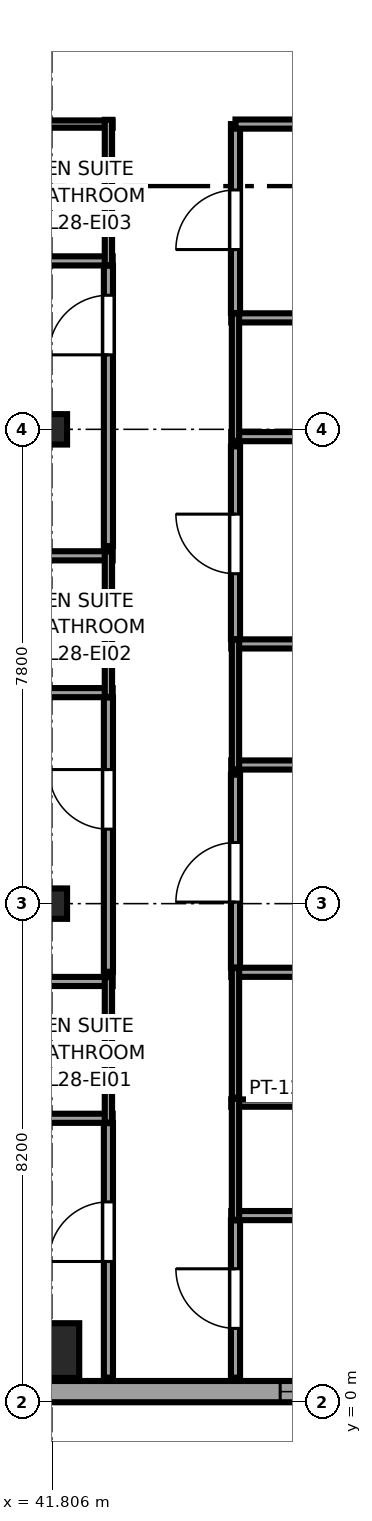
"""IFC4 building model, lengths in metres.
Left out: names, types, materials, properties, quantities, classifications, styles, units other than length and angle.
Written with IfcOpenShell. Run it as: python <this file> out.ifc"""

import sys

from ifc_helpers import new_model, si_unit, direction, frame, frame_2d, origin, origin_2d, place, context, subcontext, project, spatial, rectangle, i_section, extrude, source, transform, mapped, element, fill, save


model = new_model("IFC4")
c1 = context("Model", 3, precision=1e-05, world=origin(), true_north=direction((0.0, 1.0)))
c2 = subcontext(c1, "Body", "Model", "MODEL_VIEW")
j1 = project(units=[si_unit("LENGTHUNIT", "METRE"), si_unit("PLANEANGLEUNIT", "RADIAN")], contexts=[c1])
p1 = place(None, origin())
s1 = spatial("IfcSite", under=j1, at=p1, CompositionType="ELEMENT")
p2 = place(p1, origin())
s2 = spatial("IfcBuilding", under=s1, at=p2, CompositionType="ELEMENT")
p3 = place(p2, frame((0.0, 0.0, 111.55)))
s3 = spatial("IfcBuildingStorey", under=s2, at=p3, CompositionType="ELEMENT", Elevation=111.55)
m1 = source(origin(), c2, "Body", "SweptSolid", [
    extrude(rectangle(XDim=0.9, YDim=0.9, at=origin_2d()), origin(), (0.0, 0.0, 1.0), 3.55),
])
p4 = place(p3, frame((41.8, 0.85, 0.0), z_axis=(0.0, 0.0, 1.0), x_axis=(1.0, 0.0, 0.0)))
e1 = element("IfcColumn", 1, at=p4, inside=s3, PredefinedType="COLUMN", context=c2, shape_type="MappedRepresentation", body=[
    mapped(m1, transform((0.0, 0.0, 0.0), x_axis=(1.0, 0.0, 0.0), y_axis=(0.0, 1.0, 0.0), z_axis=(0.0, 0.0, 1.0), scale=1.0)),
])
m2 = source(origin(), c2, "Body", "SweptSolid", [
    extrude(i_section(OverallWidth=0.5, OverallDepth=0.5, WebThickness=0.022, FlangeThickness=0.034, at=origin_2d()), origin(), (0.0, 0.0, 1.0), 3.55),
])
for number, where, z_axis, x_axis in (
    (2, (41.8, 8.2, 0.0), (0.0, 0.0, 1.0), (1.0, 0.0, 0.0)),
    (3, (41.8, 16.0, 0.0), (0.0, 0.0, 1.0), (1.0, 0.0, 0.0)),
):
    element("IfcColumn", number, at=place(p3, frame(where, z_axis=z_axis, x_axis=x_axis)), inside=s3, PredefinedType="COLUMN", context=c2, shape_type="MappedRepresentation", body=[
        mapped(m2, transform((0.0, 0.0, 0.0), x_axis=(1.0, 0.0, 0.0), y_axis=(0.0, 1.0, 0.0), z_axis=(0.0, 0.0, 1.0), scale=1.0)),
    ])
p5 = place(p3, frame((34.375, 0.175, 0.0), z_axis=(0.0, 0.0, 1.0), x_axis=(1.0, 0.0, 0.0)))
e4 = element("IfcWall", 4, at=p5, inside=s3, PredefinedType="SOLIDWALL", context=c2, shape_type="SweptSolid", body=[
    extrude(rectangle(XDim=18.008, YDim=0.35, at=frame_2d((9.004, 0.0))), origin(), (0.0, 0.0, 1.0), 3.37),
])
p6 = place(p5, frame((1.726, 0.0, 0.68)))
e5 = element("IfcOpeningElement", 5, at=p6, cuts=e4, PredefinedType="OPENING", context=c2, shape_type="SweptSolid", body=[
    extrude(rectangle(XDim=1.95, YDim=1.82, at=frame_2d((0.975, 0.91))), frame((0.0, 0.185, 0.0), z_axis=(0.0, -1.0, 0.0), x_axis=(1.0, 0.0, 0.0)), (0.0, 0.0, 1.0), 0.37),
])
p7 = place(p5, frame((11.18, 0.0, 0.68)))
e6 = element("IfcOpeningElement", 6, at=p7, cuts=e4, PredefinedType="OPENING", context=c2, shape_type="SweptSolid", body=[
    extrude(rectangle(XDim=1.95, YDim=1.82, at=frame_2d((0.975, 0.91))), frame((0.0, 0.185, 0.0), z_axis=(0.0, -1.0, 0.0), x_axis=(1.0, 0.0, 0.0)), (0.0, 0.0, 1.0), 0.37),
])
for number, where, z_axis, x_axis in (
    (7, (40.21, 4.67, 0.0), (0.0, 0.0, 1.0), (1.0, 0.0, 0.0)),
    (8, (40.21, 6.92, 0.0), (0.0, 0.0, 1.0), (1.0, 0.0, 0.0)),
):
    element("IfcWall", number, at=place(p3, frame(where, z_axis=z_axis, x_axis=x_axis)), inside=s3, PredefinedType="PARTITIONING", context=c2, shape_type="SweptSolid", body=[
        extrude(rectangle(XDim=2.59, YDim=0.15, at=frame_2d((1.295, 0.0))), origin(), (0.0, 0.0, 1.0), 3.37),
    ])
p8 = place(p3, frame((42.73, 4.6, 0.0), z_axis=(0.0, 0.0, 1.0), x_axis=(0.0, 1.0, 0.0)))
e9 = element("IfcWall", 9, at=p8, inside=s3, PredefinedType="PLUMBINGWALL", context=c2, shape_type="SweptSolid", body=[
    extrude(rectangle(XDim=2.39, YDim=0.12, at=frame_2d((1.195, 0.0))), origin(), (0.0, 0.0, 1.0), 3.37),
])
for number, where, z_axis, x_axis in (
    (10, (40.21, 11.67, 0.0), (0.0, 0.0, 1.0), (1.0, 0.0, 0.0)),
    (11, (40.21, 13.92, 0.0), (0.0, 0.0, 1.0), (1.0, 0.0, 0.0)),
):
    element("IfcWall", number, at=place(p3, frame(where, z_axis=z_axis, x_axis=x_axis)), inside=s3, PredefinedType="PARTITIONING", context=c2, shape_type="SweptSolid", body=[
        extrude(rectangle(XDim=2.59, YDim=0.15, at=frame_2d((1.295, 0.0))), origin(), (0.0, 0.0, 1.0), 3.37),
    ])
p9 = place(p3, frame((42.73, 11.6, 0.0), z_axis=(0.0, 0.0, 1.0), x_axis=(0.0, 1.0, 0.0)))
e12 = element("IfcWall", 12, at=p9, inside=s3, PredefinedType="PLUMBINGWALL", context=c2, shape_type="SweptSolid", body=[
    extrude(rectangle(XDim=2.39, YDim=0.12, at=frame_2d((1.195, 0.0))), origin(), (0.0, 0.0, 1.0), 3.37),
])
p10 = place(p3, frame((40.21, 18.77, 0.0), z_axis=(0.0, 0.0, 1.0), x_axis=(1.0, 0.0, 0.0)))
e13 = element("IfcWall", 13, at=p10, inside=s3, PredefinedType="PARTITIONING", context=c2, shape_type="SweptSolid", body=[
    extrude(rectangle(XDim=2.59, YDim=0.15, at=frame_2d((1.295, 0.0))), origin(), (0.0, 0.0, 1.0), 3.37),
])
p11 = place(p3, frame((40.21, 21.02, 0.0), z_axis=(0.0, 0.0, 1.0), x_axis=(1.0, 0.0, 0.0)))
e14 = element("IfcWall", 14, at=p11, inside=s3, PredefinedType="PLUMBINGWALL", context=c2, shape_type="SweptSolid", body=[
    extrude(rectangle(XDim=2.59, YDim=0.12, at=frame_2d((1.295, 0.0))), origin(), (0.0, 0.0, 1.0), 3.37),
])
p12 = place(p3, frame((42.73, 18.7, 0.0), z_axis=(0.0, 0.0, 1.0), x_axis=(0.0, 1.0, 0.0)))
e15 = element("IfcWall", 15, at=p12, inside=s3, PredefinedType="PLUMBINGWALL", context=c2, shape_type="SweptSolid", body=[
    extrude(rectangle(XDim=2.39, YDim=0.12, at=frame_2d((1.195, 0.0))), origin(), (0.0, 0.0, 1.0), 3.37),
])
p13 = place(p3, frame((44.75, 3.07, 0.0), z_axis=(0.0, 0.0, 1.0), x_axis=(1.0, 0.0, 0.0)))
e16 = element("IfcWall", 16, at=p13, inside=s3, PredefinedType="PARTITIONING", context=c2, shape_type="SweptSolid", body=[
    extrude(rectangle(XDim=2.59, YDim=0.15, at=frame_2d((1.295, 0.0))), origin(), (0.0, 0.0, 1.0), 3.37),
])
p14 = place(p3, frame((44.75, 4.92, 0.0), z_axis=(0.0, 0.0, 1.0), x_axis=(1.0, 0.0, 0.0)))
e17 = element("IfcWall", 17, at=p14, inside=s3, PredefinedType="PLUMBINGWALL", context=c2, shape_type="SweptSolid", body=[
    extrude(rectangle(XDim=2.59, YDim=0.12, at=frame_2d((1.295, 0.0))), origin(), (0.0, 0.0, 1.0), 3.37),
])
p15 = place(p3, frame((44.82, 3.0, 0.0), z_axis=(0.0, 0.0, 1.0), x_axis=(0.0, 1.0, 0.0)))
e18 = element("IfcWall", 18, at=p15, inside=s3, PredefinedType="PLUMBINGWALL", context=c2, shape_type="SweptSolid", body=[
    extrude(rectangle(XDim=1.99, YDim=0.12, at=frame_2d((0.995, 0.0))), origin(), (0.0, 0.0, 1.0), 3.37),
])
p16 = place(p3, frame((44.75, 7.071, 0.0), z_axis=(0.0, 0.0, 1.0), x_axis=(1.0, 0.0, 0.0)))
e19 = element("IfcWall", 19, at=p16, inside=s3, PredefinedType="PARTITIONING", context=c2, shape_type="SweptSolid", body=[
    extrude(rectangle(XDim=2.59, YDim=0.15, at=frame_2d((1.295, 0.0))), origin(), (0.0, 0.0, 1.0), 3.37),
])
p17 = place(p3, frame((44.82, 5.01, 0.0), z_axis=(0.0, 0.0, 1.0), x_axis=(0.0, 1.0, 0.0)))
e20 = element("IfcWall", 20, at=p17, inside=s3, PredefinedType="PLUMBINGWALL", context=c2, shape_type="SweptSolid", body=[
    extrude(rectangle(XDim=2.131, YDim=0.12, at=frame_2d((1.065, 0.0))), origin(), (0.0, 0.0, 1.0), 3.37),
])
p18 = place(p3, frame((44.75, 10.48, 0.0), z_axis=(0.0, 0.0, 1.0), x_axis=(1.0, 0.0, 0.0)))
e21 = element("IfcWall", 21, at=p18, inside=s3, PredefinedType="PARTITIONING", context=c2, shape_type="SweptSolid", body=[
    extrude(rectangle(XDim=11.845, YDim=0.15, at=frame_2d((5.922, 0.0))), origin(), (0.0, 0.0, 1.0), 3.37),
])
p19 = place(p3, frame((44.75, 12.471, 0.0), z_axis=(0.0, 0.0, 1.0), x_axis=(1.0, 0.0, 0.0)))
e22 = element("IfcWall", 22, at=p19, inside=s3, PredefinedType="PARTITIONING", context=c2, shape_type="SweptSolid", body=[
    extrude(rectangle(XDim=2.59, YDim=0.15, at=frame_2d((1.295, 0.0))), origin(), (0.0, 0.0, 1.0), 3.37),
])
p20 = place(p3, frame((44.82, 10.41, 0.0), z_axis=(0.0, 0.0, 1.0), x_axis=(0.0, 1.0, 0.0)))
e23 = element("IfcWall", 23, at=p20, inside=s3, PredefinedType="PLUMBINGWALL", context=c2, shape_type="SweptSolid", body=[
    extrude(rectangle(XDim=2.131, YDim=0.12, at=frame_2d((1.065, 0.0))), origin(), (0.0, 0.0, 1.0), 3.37),
])
p21 = place(p3, frame((44.75, 15.88, 0.0), z_axis=(0.0, 0.0, 1.0), x_axis=(1.0, 0.0, 0.0)))
e24 = element("IfcWall", 24, at=p21, inside=s3, PredefinedType="PARTITIONING", context=c2, shape_type="SweptSolid", body=[
    extrude(rectangle(XDim=11.845, YDim=0.15, at=frame_2d((5.922, 0.0))), origin(), (0.0, 0.0, 1.0), 2.748),
])
p22 = place(p3, frame((44.75, 17.833, 0.0), z_axis=(0.0, 0.0, 1.0), x_axis=(1.0, 0.0, 0.0)))
e25 = element("IfcWall", 25, at=p22, inside=s3, PredefinedType="PARTITIONING", context=c2, shape_type="SweptSolid", body=[
    extrude(rectangle(XDim=2.59, YDim=0.15, at=frame_2d((1.295, 0.0))), origin(), (0.0, 0.0, 1.0), 3.37),
])
p23 = place(p3, frame((44.82, 15.81, 0.0), z_axis=(0.0, 0.0, 1.0), x_axis=(0.0, 1.0, 0.0)))
e26 = element("IfcWall", 26, at=p23, inside=s3, PredefinedType="PLUMBINGWALL", context=c2, shape_type="SweptSolid", body=[
    extrude(rectangle(XDim=2.093, YDim=0.12, at=frame_2d((1.046, 0.0))), origin(), (0.0, 0.0, 1.0), 3.37),
])
p24 = place(p3, frame((42.73, 0.405, 0.0), z_axis=(0.0, 0.0, 1.0), x_axis=(0.0, 1.0, 0.0)))
e27 = element("IfcWall", 27, at=p24, inside=s3, PredefinedType="PARTITIONING", context=c2, shape_type="SweptSolid", body=[
    extrude(rectangle(XDim=4.185, YDim=0.15, at=frame_2d((2.093, 0.0))), origin(), (0.0, 0.0, 1.0), 3.37),
])
p25 = place(p24, frame((1.91, 0.0, 0.0)))
e28 = element("IfcOpeningElement", 28, at=p25, cuts=e27, PredefinedType="OPENING", context=c2, shape_type="SweptSolid", body=[
    extrude(rectangle(XDim=0.98, YDim=2.12, at=frame_2d((0.49, 1.06))), frame((0.0, 0.085, 0.0), z_axis=(0.0, -1.0, 0.0), x_axis=(1.0, 0.0, 0.0)), (0.0, 0.0, 1.0), 0.17),
])
p26 = place(p3, frame((42.73, 7.08, 0.0), z_axis=(0.0, 0.0, 1.0), x_axis=(0.0, 1.0, 0.0)))
e29 = element("IfcWall", 29, at=p26, inside=s3, PredefinedType="PARTITIONING", context=c2, shape_type="SweptSolid", body=[
    extrude(rectangle(XDim=4.51, YDim=0.15, at=frame_2d((2.255, 0.0))), origin(), (0.0, 0.0, 1.0), 3.37),
])
p27 = place(p26, frame((2.345, 0.0, 0.0)))
e30 = element("IfcOpeningElement", 30, at=p27, cuts=e29, PredefinedType="OPENING", context=c2, shape_type="SweptSolid", body=[
    extrude(rectangle(XDim=0.98, YDim=2.12, at=frame_2d((0.49, 1.06))), frame((0.0, 0.085, 0.0), z_axis=(0.0, -1.0, 0.0), x_axis=(1.0, 0.0, 0.0)), (0.0, 0.0, 1.0), 0.17),
])
p28 = place(p3, frame((42.73, 14.08, 0.0), z_axis=(0.0, 0.0, 1.0), x_axis=(0.0, 1.0, 0.0)))
e31 = element("IfcWall", 31, at=p28, inside=s3, PredefinedType="PARTITIONING", context=c2, shape_type="SweptSolid", body=[
    extrude(rectangle(XDim=4.61, YDim=0.15, at=frame_2d((2.305, 0.0))), origin(), (0.0, 0.0, 1.0), 3.37),
])
p29 = place(p28, frame((3.145, 0.0, 0.0)))
e32 = element("IfcOpeningElement", 32, at=p29, cuts=e31, PredefinedType="OPENING", context=c2, shape_type="SweptSolid", body=[
    extrude(rectangle(XDim=0.98, YDim=2.12, at=frame_2d((0.49, 1.06))), frame((0.0, 0.085, 0.0), z_axis=(0.0, -1.0, 0.0), x_axis=(1.0, 0.0, 0.0)), (0.0, 0.0, 1.0), 0.17),
])
p30 = place(p3, frame((44.82, 0.405, 0.0), z_axis=(0.0, 0.0, 1.0), x_axis=(0.0, 1.0, 0.0)))
e33 = element("IfcWall", 33, at=p30, inside=s3, PredefinedType="PARTITIONING", context=c2, shape_type="SweptSolid", body=[
    extrude(rectangle(XDim=2.585, YDim=0.15, at=frame_2d((1.292, 0.0))), origin(), (0.0, 0.0, 1.0), 3.37),
])
p31 = place(p30, frame((0.81, 0.0, 0.0)))
e34 = element("IfcOpeningElement", 34, at=p31, cuts=e33, PredefinedType="OPENING", context=c2, shape_type="SweptSolid", body=[
    extrude(rectangle(XDim=0.98, YDim=2.12, at=frame_2d((0.49, 1.06))), frame((0.0, 0.085, 0.0), z_axis=(0.0, -1.0, 0.0), x_axis=(1.0, 0.0, 0.0)), (0.0, 0.0, 1.0), 0.17),
])
p32 = place(p3, frame((44.82, 7.151, 0.0), z_axis=(0.0, 0.0, 1.0), x_axis=(0.0, 1.0, 0.0)))
e35 = element("IfcWall", 35, at=p32, inside=s3, PredefinedType="PARTITIONING", context=c2, shape_type="SweptSolid", body=[
    extrude(rectangle(XDim=3.169, YDim=0.15, at=frame_2d((1.584, 0.0))), origin(), (0.0, 0.0, 1.0), 3.37),
])
p33 = place(p32, frame((1.074, 0.0, 0.0)))
e36 = element("IfcOpeningElement", 36, at=p33, cuts=e35, PredefinedType="OPENING", context=c2, shape_type="SweptSolid", body=[
    extrude(rectangle(XDim=0.98, YDim=2.12, at=frame_2d((0.49, 1.06))), frame((0.0, 0.085, 0.0), z_axis=(0.0, -1.0, 0.0), x_axis=(1.0, 0.0, 0.0)), (0.0, 0.0, 1.0), 0.17),
])
p34 = place(p3, frame((44.82, 12.551, 0.0), z_axis=(0.0, 0.0, 1.0), x_axis=(0.0, 1.0, 0.0)))
e37 = element("IfcWall", 37, at=p34, inside=s3, PredefinedType="PARTITIONING", context=c2, shape_type="SweptSolid", body=[
    extrude(rectangle(XDim=3.169, YDim=0.15, at=frame_2d((1.584, 0.0))), origin(), (0.0, 0.0, 1.0), 3.37),
])
p35 = place(p34, frame((1.074, 0.0, 0.0)))
e38 = element("IfcOpeningElement", 38, at=p35, cuts=e37, PredefinedType="OPENING", context=c2, shape_type="SweptSolid", body=[
    extrude(rectangle(XDim=0.98, YDim=2.12, at=frame_2d((0.49, 1.06))), frame((0.0, 0.085, 0.0), z_axis=(0.0, -1.0, 0.0), x_axis=(1.0, 0.0, 0.0)), (0.0, 0.0, 1.0), 0.17),
])
p36 = place(p3, frame((44.82, 17.913, 0.0), z_axis=(0.0, 0.0, 1.0), x_axis=(0.0, 1.0, 0.0)))
e39 = element("IfcWall", 39, at=p36, inside=s3, PredefinedType="PARTITIONING", context=c2, shape_type="SweptSolid", body=[
    extrude(rectangle(XDim=3.107, YDim=0.15, at=frame_2d((1.553, 0.0))), origin(), (0.0, 0.0, 1.0), 3.37),
])
p37 = place(p36, frame((1.043, 0.0, 0.0)))
e40 = element("IfcOpeningElement", 40, at=p37, cuts=e39, PredefinedType="OPENING", context=c2, shape_type="SweptSolid", body=[
    extrude(rectangle(XDim=0.98, YDim=2.12, at=frame_2d((0.49, 1.06))), frame((0.0, 0.085, 0.0), z_axis=(0.0, -1.0, 0.0), x_axis=(1.0, 0.0, 0.0)), (0.0, 0.0, 1.0), 0.17),
])
p38 = place(p3, frame((44.82, 21.02, 0.0), z_axis=(0.0, 0.0, 1.0), x_axis=(1.0, 0.0, 0.0)))
e41 = element("IfcWall", 41, at=p38, inside=s3, PredefinedType="PARTITIONING", context=c2, shape_type="SweptSolid", body=[
    extrude(rectangle(XDim=11.775, YDim=0.15, at=frame_2d((5.887, 0.0))), origin(), (0.0, 0.0, 1.0), 3.37),
])
m3 = source(origin(), c2, "Body", "SweptSolid", [
    extrude(rectangle(XDim=1.95, YDim=1.82, at=frame_2d((0.975, 0.91))), frame((0.0, 0.09, 0.0), z_axis=(0.0, -1.0, 0.0), x_axis=(1.0, 0.0, 0.0)), (0.0, 0.0, 1.0), 0.06),
])
p39 = place(p7, origin())
e42 = element("IfcWindow", 42, at=p39, inside=s3, PartitioningType="DOUBLE_PANEL_VERTICAL", PredefinedType="WINDOW", context=c2, shape_type="MappedRepresentation", body=[
    mapped(m3, transform((0.0, 0.0, 0.0), x_axis=(1.0, 0.0, 0.0), y_axis=(0.0, 1.0, 0.0), z_axis=(0.0, 0.0, 1.0), scale=1.0)),
])
fill(e6, e42)
m4 = source(origin(), c2, "Body", "SweptSolid", [
    extrude(rectangle(XDim=0.98, YDim=2.12, at=frame_2d((0.49, 1.06))), frame((0.0, 0.025, 0.0), z_axis=(0.0, -1.0, 0.0), x_axis=(1.0, 0.0, 0.0)), (0.0, 0.0, 1.0), 0.05),
])
p40 = place(p25, origin())
e43 = element("IfcDoor", 43, at=p40, inside=s3, OperationType="SINGLE_SWING_LEFT", PredefinedType="DOOR", context=c2, shape_type="MappedRepresentation", body=[
    mapped(m4, transform((0.0, 0.0, 0.0), x_axis=(1.0, 0.0, 0.0), y_axis=(0.0, 1.0, 0.0), z_axis=(0.0, 0.0, 1.0), scale=1.0)),
])
fill(e28, e43)
p41 = place(p27, origin())
e44 = element("IfcDoor", 44, at=p41, inside=s3, OperationType="SINGLE_SWING_RIGHT", PredefinedType="DOOR", context=c2, shape_type="MappedRepresentation", body=[
    mapped(m4, transform((0.0, 0.0, 0.0), x_axis=(1.0, 0.0, 0.0), y_axis=(0.0, 1.0, 0.0), z_axis=(0.0, 0.0, 1.0), scale=1.0)),
])
fill(e30, e44)
p42 = place(p29, origin())
e45 = element("IfcDoor", 45, at=p42, inside=s3, OperationType="SINGLE_SWING_LEFT", PredefinedType="DOOR", context=c2, shape_type="MappedRepresentation", body=[
    mapped(m4, transform((0.0, 0.0, 0.0), x_axis=(1.0, 0.0, 0.0), y_axis=(0.0, 1.0, 0.0), z_axis=(0.0, 0.0, 1.0), scale=1.0)),
])
fill(e32, e45)
p43 = place(p31, origin())
e46 = element("IfcDoor", 46, at=p43, inside=s3, OperationType="SINGLE_SWING_RIGHT", PredefinedType="DOOR", context=c2, shape_type="MappedRepresentation", body=[
    mapped(m4, transform((0.0, 0.0, 0.0), x_axis=(1.0, 0.0, 0.0), y_axis=(0.0, 1.0, 0.0), z_axis=(0.0, 0.0, 1.0), scale=1.0)),
])
fill(e34, e46)
p44 = place(p33, origin())
e47 = element("IfcDoor", 47, at=p44, inside=s3, OperationType="SINGLE_SWING_LEFT", PredefinedType="DOOR", context=c2, shape_type="MappedRepresentation", body=[
    mapped(m4, transform((0.0, 0.0, 0.0), x_axis=(1.0, 0.0, 0.0), y_axis=(0.0, 1.0, 0.0), z_axis=(0.0, 0.0, 1.0), scale=1.0)),
])
fill(e36, e47)
p45 = place(p35, origin())
e48 = element("IfcDoor", 48, at=p45, inside=s3, OperationType="SINGLE_SWING_RIGHT", PredefinedType="DOOR", context=c2, shape_type="MappedRepresentation", body=[
    mapped(m4, transform((0.0, 0.0, 0.0), x_axis=(1.0, 0.0, 0.0), y_axis=(0.0, 1.0, 0.0), z_axis=(0.0, 0.0, 1.0), scale=1.0)),
])
fill(e38, e48)
p46 = place(p37, origin())
e49 = element("IfcDoor", 49, at=p46, inside=s3, OperationType="SINGLE_SWING_LEFT", PredefinedType="DOOR", context=c2, shape_type="MappedRepresentation", body=[
    mapped(m4, transform((0.0, 0.0, 0.0), x_axis=(1.0, 0.0, 0.0), y_axis=(0.0, 1.0, 0.0), z_axis=(0.0, 0.0, 1.0), scale=1.0)),
])
fill(e40, e49)
save(model, sys.argv[1])
